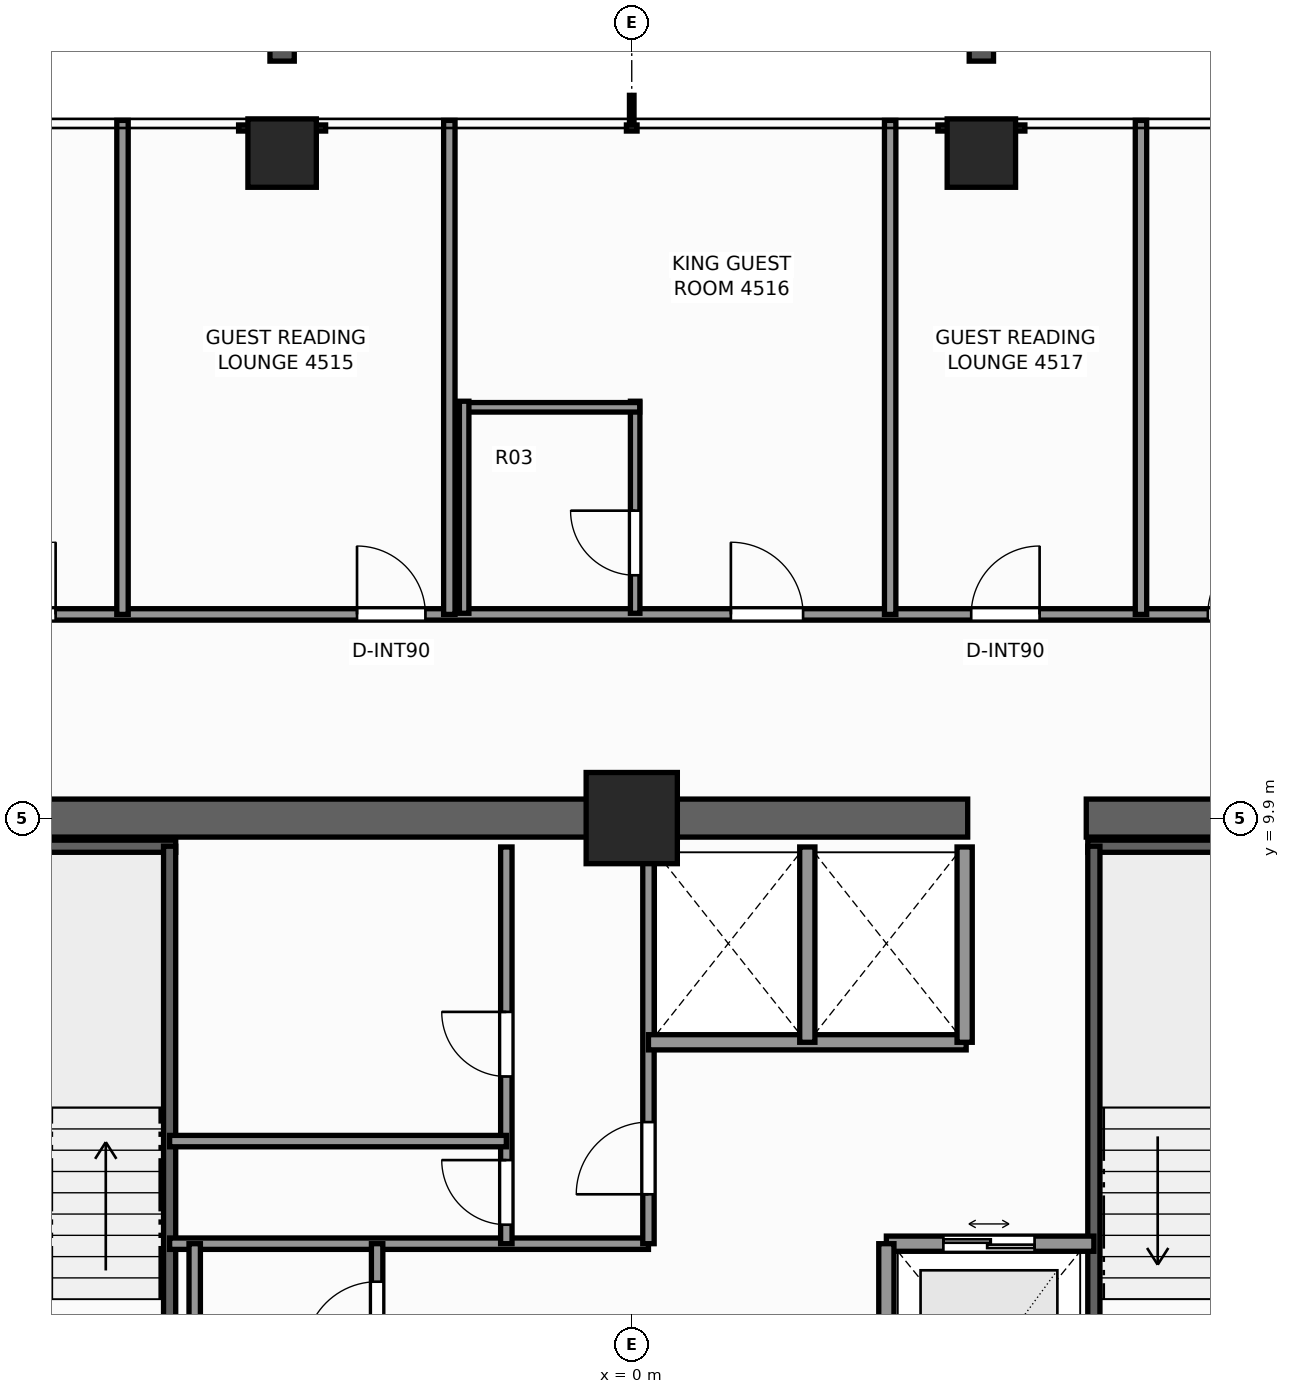
"""IFC4 building model, lengths in metres.
Left out: names, types, materials, properties, quantities, classifications, styles, units other than length and angle.
Written with IfcOpenShell. Run it as: python <this file> out.ifc"""

import sys

from ifc_helpers import new_model, si_unit, direction, frame, frame_2d, origin, origin_2d, place, context, subcontext, project, spatial, rectangle, extrude, element, fill, save


model = new_model("IFC4")
c1 = context("Model", 3, precision=1e-05, world=origin(), true_north=direction((0.0, 1.0)))
c2 = subcontext(c1, "Body", "Model", "MODEL_VIEW")
j1 = project(units=[si_unit("LENGTHUNIT", "METRE"), si_unit("PLANEANGLEUNIT", "RADIAN")], contexts=[c1])
p1 = place(None, origin())
s1 = spatial("IfcSite", under=j1, at=p1, CompositionType="ELEMENT")
p2 = place(p1, origin())
s2 = spatial("IfcBuilding", under=s1, at=p2, CompositionType="ELEMENT")
p3 = place(p2, frame((0.0, 0.0, 156.9)))
s3 = spatial("IfcBuildingStorey", under=s2, at=p3, CompositionType="ELEMENT", Elevation=156.9)
p4 = place(p3, frame((-10.15, 9.9, 0.0), z_axis=(0.0, 0.0, 1.0), x_axis=(1.0, 0.0, 0.0)))
e1 = element("IfcWall", 1, at=p4, inside=s3, PredefinedType="SHEAR", context=c2, shape_type="SweptSolid", body=[
    extrude(rectangle(XDim=14.57, YDim=0.5, at=frame_2d((7.285, 0.0))), origin(), (0.0, 0.0, 1.0), 3.3),
])
p5 = place(p3, frame((5.98, 9.9, 0.0), z_axis=(0.0, 0.0, 1.0), x_axis=(1.0, 0.0, 0.0)))
e2 = element("IfcWall", 2, at=p5, inside=s3, PredefinedType="SHEAR", context=c2, shape_type="SweptSolid", body=[
    extrude(rectangle(XDim=4.17, YDim=0.5, at=frame_2d((2.085, 0.0))), origin(), (0.0, 0.0, 1.0), 3.3),
])
p6 = place(p3, frame((0.0, 9.9, 0.0), z_axis=(0.0, 0.0, 1.0), x_axis=(1.0, 0.0, 0.0)))
e3 = element("IfcColumn", 3, at=p6, inside=s3, PredefinedType="COLUMN", context=c2, shape_type="SweptSolid", body=[
    extrude(rectangle(XDim=1.2, YDim=1.2, at=origin_2d()), origin(), (0.0, 0.0, 1.0), 3.3),
])
for number, where, z_axis, x_axis in (
    (4, (-4.6, 18.65, 0.0), (0.0, 0.0, 1.0), (1.0, 0.0, 0.0)),
    (5, (4.6, 18.65, 0.0), (0.0, 0.0, 1.0), (1.0, 0.0, 0.0)),
):
    element("IfcColumn", number, at=place(p3, frame(where, z_axis=z_axis, x_axis=x_axis)), inside=s3, PredefinedType="COLUMN", context=c2, shape_type="SweptSolid", body=[
        extrude(rectangle(XDim=0.9, YDim=0.9, at=origin_2d()), origin(), (0.0, 0.0, 1.0), 3.3),
    ])
p7 = place(p3, frame((-9.52, 9.53, 0.0), z_axis=(0.0, 0.0, 1.0), x_axis=(1.0, 0.0, 0.0)))
e6 = element("IfcWall", 6, at=p7, inside=s3, PredefinedType="SHEAR", context=c2, shape_type="SweptSolid", body=[
    extrude(rectangle(XDim=3.52, YDim=0.16, at=frame_2d((1.76, 0.0))), origin(), (0.0, 0.0, 1.0), 3.3),
])
p8 = place(p3, frame((-6.08, 1.97, 0.0), z_axis=(0.0, 0.0, 1.0), x_axis=(0.0, 1.0, 0.0)))
e7 = element("IfcWall", 7, at=p8, inside=s3, PredefinedType="SHEAR", context=c2, shape_type="SweptSolid", body=[
    extrude(rectangle(XDim=7.56, YDim=0.16, at=frame_2d((3.78, 0.0))), origin(), (0.0, 0.0, 1.0), 3.3),
])
p9 = place(p3, frame((6.0, 9.53, 0.0), z_axis=(0.0, 0.0, 1.0), x_axis=(1.0, 0.0, 0.0)))
e8 = element("IfcWall", 8, at=p9, inside=s3, PredefinedType="SHEAR", context=c2, shape_type="SweptSolid", body=[
    extrude(rectangle(XDim=3.52, YDim=0.16, at=frame_2d((1.76, 0.0))), origin(), (0.0, 0.0, 1.0), 3.3),
])
p10 = place(p3, frame((6.08, 1.97, 0.0), z_axis=(0.0, 0.0, 1.0), x_axis=(0.0, 1.0, 0.0)))
e9 = element("IfcWall", 9, at=p10, inside=s3, PredefinedType="SHEAR", context=c2, shape_type="SweptSolid", body=[
    extrude(rectangle(XDim=7.56, YDim=0.16, at=frame_2d((3.78, 0.0))), origin(), (0.0, 0.0, 1.0), 3.3),
])
p11 = place(p3, frame((3.35, 4.3, 0.0), z_axis=(0.0, 0.0, 1.0), x_axis=(1.0, 0.0, 0.0)))
e10 = element("IfcWall", 10, at=p11, inside=s3, PredefinedType="SOLIDWALL", context=c2, shape_type="SweptSolid", body=[
    extrude(rectangle(XDim=2.73, YDim=0.2, at=frame_2d((1.365, 0.0))), origin(), (0.0, 0.0, 1.0), 3.1),
])
p12 = place(p11, frame((0.75, 0.0, 0.0)))
e11 = element("IfcOpeningElement", 11, at=p12, cuts=e10, PredefinedType="OPENING", context=c2, shape_type="SweptSolid", body=[
    extrude(rectangle(XDim=1.2, YDim=2.25, at=frame_2d((0.6, 1.125))), frame((0.0, 0.11, 0.0), z_axis=(0.0, -1.0, 0.0), x_axis=(1.0, 0.0, 0.0)), (0.0, 0.0, 1.0), 0.22),
])
p13 = place(p3, frame((3.35, 1.1, 0.0), z_axis=(0.0, 0.0, 1.0), x_axis=(0.0, 1.0, 0.0)))
e12 = element("IfcWall", 12, at=p13, inside=s3, PredefinedType="SOLIDWALL", context=c2, shape_type="SweptSolid", body=[
    extrude(rectangle(XDim=3.2, YDim=0.2, at=frame_2d((1.6, 0.0))), origin(), (0.0, 0.0, 1.0), 2.735),
])
p14 = place(p3, frame((-6.08, 4.3, 0.0), z_axis=(0.0, 0.0, 1.0), x_axis=(1.0, 0.0, 0.0)))
e13 = element("IfcWall", 13, at=p14, inside=s3, PredefinedType="PARTITIONING", context=c2, shape_type="SweptSolid", body=[
    extrude(rectangle(XDim=6.3, YDim=0.15, at=frame_2d((3.15, 0.0))), origin(), (0.0, 0.0, 1.0), 3.1),
])
p15 = place(p3, frame((0.22, 4.3, 0.0), z_axis=(0.0, 0.0, 1.0), x_axis=(0.0, 1.0, 0.0)))
e14 = element("IfcWall", 14, at=p15, inside=s3, PredefinedType="PARTITIONING", context=c2, shape_type="SweptSolid", body=[
    extrude(rectangle(XDim=5.22, YDim=0.15, at=frame_2d((2.61, 0.0))), origin(), (0.0, 0.0, 1.0), 3.1),
])
p16 = place(p15, frame((0.65, 0.0, 0.0)))
e15 = element("IfcOpeningElement", 15, at=p16, cuts=e14, PredefinedType="OPENING", context=c2, shape_type="SweptSolid", body=[
    extrude(rectangle(XDim=0.95, YDim=2.06, at=frame_2d((0.475, 1.03))), frame((0.0, 0.085, 0.0), z_axis=(0.0, -1.0, 0.0), x_axis=(1.0, 0.0, 0.0)), (0.0, 0.0, 1.0), 0.17),
])
p17 = place(p3, frame((-1.65, 4.3, 0.0), z_axis=(0.0, 0.0, 1.0), x_axis=(0.0, 1.0, 0.0)))
e16 = element("IfcWall", 16, at=p17, inside=s3, PredefinedType="PARTITIONING", context=c2, shape_type="SweptSolid", body=[
    extrude(rectangle(XDim=5.22, YDim=0.15, at=frame_2d((2.61, 0.0))), origin(), (0.0, 0.0, 1.0), 3.1),
])
p18 = place(p17, frame((2.2, 0.0, 0.0)))
e17 = element("IfcOpeningElement", 17, at=p18, cuts=e16, PredefinedType="OPENING", context=c2, shape_type="SweptSolid", body=[
    extrude(rectangle(XDim=0.85, YDim=2.03, at=frame_2d((0.425, 1.015))), frame((0.0, 0.085, 0.0), z_axis=(0.0, -1.0, 0.0), x_axis=(1.0, 0.0, 0.0)), (0.0, 0.0, 1.0), 0.17),
])
p19 = place(p17, frame((0.25, 0.0, 0.0)))
e18 = element("IfcOpeningElement", 18, at=p19, cuts=e16, PredefinedType="OPENING", context=c2, shape_type="SweptSolid", body=[
    extrude(rectangle(XDim=0.85, YDim=2.03, at=frame_2d((0.425, 1.015))), frame((0.0, 0.085, 0.0), z_axis=(0.0, -1.0, 0.0), x_axis=(1.0, 0.0, 0.0)), (0.0, 0.0, 1.0), 0.17),
])
p20 = place(p3, frame((-6.08, 5.65, 0.0), z_axis=(0.0, 0.0, 1.0), x_axis=(1.0, 0.0, 0.0)))
e19 = element("IfcWall", 19, at=p20, inside=s3, PredefinedType="PARTITIONING", context=c2, shape_type="SweptSolid", body=[
    extrude(rectangle(XDim=4.43, YDim=0.15, at=frame_2d((2.215, 0.0))), origin(), (0.0, 0.0, 1.0), 3.1),
])
p21 = place(p3, frame((0.22, 6.95, 0.0), z_axis=(0.0, 0.0, 1.0), x_axis=(1.0, 0.0, 0.0)))
e20 = element("IfcWall", 20, at=p21, inside=s3, PredefinedType="SOLIDWALL", context=c2, shape_type="SweptSolid", body=[
    extrude(rectangle(XDim=4.18, YDim=0.2, at=frame_2d((2.09, 0.0))), origin(), (0.0, 0.0, 1.0), 3.1),
])
for number, where, z_axis, x_axis in (
    (21, (4.38, 6.95, 0.0), (0.0, 0.0, 1.0), (0.0, 1.0, 0.0)),
    (22, (2.31, 6.95, 0.0), (0.0, 0.0, 1.0), (0.0, 1.0, 0.0)),
):
    element("IfcWall", number, at=place(p3, frame(where, z_axis=z_axis, x_axis=x_axis)), inside=s3, PredefinedType="SOLIDWALL", context=c2, shape_type="SweptSolid", body=[
        extrude(rectangle(XDim=2.57, YDim=0.2, at=frame_2d((1.285, 0.0))), origin(), (0.0, 0.0, 1.0), 3.1),
    ])
p22 = place(p3, frame((-3.35, 1.1, 0.0), z_axis=(0.0, 0.0, 1.0), x_axis=(0.0, 1.0, 0.0)))
e23 = element("IfcWall", 23, at=p22, inside=s3, PredefinedType="PARTITIONING", context=c2, shape_type="SweptSolid", body=[
    extrude(rectangle(XDim=3.2, YDim=0.15, at=frame_2d((1.6, 0.0))), origin(), (0.0, 0.0, 1.0), 2.735),
])
p23 = place(p22, frame((1.75, 0.0, 0.0)))
e24 = element("IfcOpeningElement", 24, at=p23, cuts=e23, PredefinedType="OPENING", context=c2, shape_type="SweptSolid", body=[
    extrude(rectangle(XDim=0.95, YDim=2.06, at=frame_2d((0.475, 1.03))), frame((0.0, 0.085, 0.0), z_axis=(0.0, -1.0, 0.0), x_axis=(1.0, 0.0, 0.0)), (0.0, 0.0, 1.0), 0.17),
])
p24 = place(p3, frame((-5.75, 1.97, 0.0), z_axis=(0.0, 0.0, 1.0), x_axis=(0.0, 1.0, 0.0)))
e25 = element("IfcWall", 25, at=p24, inside=s3, PredefinedType="PARTITIONING", context=c2, shape_type="SweptSolid", body=[
    extrude(rectangle(XDim=2.33, YDim=0.15, at=frame_2d((1.165, 0.0))), origin(), (0.0, 0.0, 1.0), 2.735),
])
p25 = place(p3, frame((-12.42, 12.58, 0.0), z_axis=(0.0, 0.0, 1.0), x_axis=(1.0, 0.0, 0.0)))
e26 = element("IfcWall", 26, at=p25, inside=s3, PredefinedType="PARTITIONING", context=c2, shape_type="SweptSolid", body=[
    extrude(rectangle(XDim=24.84, YDim=0.15, at=frame_2d((12.42, 0.0))), origin(), (0.0, 0.0, 1.0), 2.389),
])
p26 = place(p25, frame((3.89, 0.0, 0.0)))
e27 = element("IfcOpeningElement", 27, at=p26, cuts=e26, PredefinedType="OPENING", context=c2, shape_type="SweptSolid", body=[
    extrude(rectangle(XDim=0.95, YDim=2.06, at=frame_2d((0.475, 1.03))), frame((0.0, 0.085, 0.0), z_axis=(0.0, -1.0, 0.0), x_axis=(1.0, 0.0, 0.0)), (0.0, 0.0, 1.0), 0.17),
])
p27 = place(p25, frame((8.806, 0.0, 0.0)))
e28 = element("IfcOpeningElement", 28, at=p27, cuts=e26, PredefinedType="OPENING", context=c2, shape_type="SweptSolid", body=[
    extrude(rectangle(XDim=0.9, YDim=2.06, at=frame_2d((0.45, 1.03))), frame((0.0, 0.085, 0.0), z_axis=(0.0, -1.0, 0.0), x_axis=(1.0, 0.0, 0.0)), (0.0, 0.0, 1.0), 0.17),
])
p28 = place(p25, frame((13.724, 0.0, 0.0)))
e29 = element("IfcOpeningElement", 29, at=p28, cuts=e26, PredefinedType="OPENING", context=c2, shape_type="SweptSolid", body=[
    extrude(rectangle(XDim=0.95, YDim=2.06, at=frame_2d((0.475, 1.03))), frame((0.0, 0.085, 0.0), z_axis=(0.0, -1.0, 0.0), x_axis=(1.0, 0.0, 0.0)), (0.0, 0.0, 1.0), 0.17),
])
p29 = place(p25, frame((16.886, 0.0, 0.0)))
e30 = element("IfcOpeningElement", 30, at=p29, cuts=e26, PredefinedType="OPENING", context=c2, shape_type="SweptSolid", body=[
    extrude(rectangle(XDim=0.9, YDim=2.06, at=frame_2d((0.45, 1.03))), frame((0.0, 0.085, 0.0), z_axis=(0.0, -1.0, 0.0), x_axis=(1.0, 0.0, 0.0)), (0.0, 0.0, 1.0), 0.17),
])
p30 = place(p25, frame((20.0, 0.0, 0.0)))
e31 = element("IfcOpeningElement", 31, at=p30, cuts=e26, PredefinedType="OPENING", context=c2, shape_type="SweptSolid", body=[
    extrude(rectangle(XDim=0.95, YDim=2.06, at=frame_2d((0.475, 1.03))), frame((0.0, 0.085, 0.0), z_axis=(0.0, -1.0, 0.0), x_axis=(1.0, 0.0, 0.0)), (0.0, 0.0, 1.0), 0.17),
])
for number, where, z_axis, x_axis in (
    (32, (-6.7, 12.58, 0.0), (0.0, 0.0, 1.0), (0.0, 1.0, 0.0)),
    (33, (-2.4, 12.58, 0.0), (0.0, 0.0, 1.0), (0.0, 1.0, 0.0)),
    (34, (3.4, 12.58, 0.0), (0.0, 0.0, 1.0), (0.0, 1.0, 0.0)),
):
    element("IfcWall", number, at=place(p3, frame(where, z_axis=z_axis, x_axis=x_axis)), inside=s3, PredefinedType="PARTITIONING", context=c2, shape_type="SweptSolid", body=[
        extrude(rectangle(XDim=6.5, YDim=0.15, at=frame_2d((3.25, 0.0))), origin(), (0.0, 0.0, 1.0), 2.473),
    ])
p31 = place(p3, frame((0.045, 12.595, 0.0), z_axis=(0.0, 0.0, 1.0), x_axis=(0.0, 1.0, 0.0)))
e35 = element("IfcWall", 35, at=p31, inside=s3, PredefinedType="PARTITIONING", context=c2, shape_type="SweptSolid", body=[
    extrude(rectangle(XDim=2.79, YDim=0.125, at=frame_2d((1.395, 0.0))), origin(), (0.0, 0.0, 1.0), 2.625),
])
p32 = place(p31, frame((0.5, 0.0, 0.0)))
e36 = element("IfcOpeningElement", 36, at=p32, cuts=e35, PredefinedType="OPENING", context=c2, shape_type="SweptSolid", body=[
    extrude(rectangle(XDim=0.85, YDim=2.03, at=frame_2d((0.425, 1.015))), frame((0.0, 0.073, 0.0), z_axis=(0.0, -1.0, 0.0), x_axis=(1.0, 0.0, 0.0)), (0.0, 0.0, 1.0), 0.145),
])
p33 = place(p3, frame((-2.265, 15.305, 0.0), z_axis=(0.0, 0.0, 1.0), x_axis=(1.0, 0.0, 0.0)))
e37 = element("IfcWall", 37, at=p33, inside=s3, PredefinedType="PARTITIONING", context=c2, shape_type="SweptSolid", body=[
    extrude(rectangle(XDim=2.37, YDim=0.125, at=frame_2d((1.185, 0.0))), origin(), (0.0, 0.0, 1.0), 2.625),
])
p34 = place(p3, frame((-2.205, 12.595, 0.0), z_axis=(0.0, 0.0, 1.0), x_axis=(0.0, 1.0, 0.0)))
e38 = element("IfcWall", 38, at=p34, inside=s3, PredefinedType="PARTITIONING", context=c2, shape_type="SweptSolid", body=[
    extrude(rectangle(XDim=2.79, YDim=0.125, at=frame_2d((1.395, 0.0))), origin(), (0.0, 0.0, 1.0), 3.1),
])
p35 = place(p3, frame((6.7, 12.58, 0.0), z_axis=(0.0, 0.0, 1.0), x_axis=(0.0, 1.0, 0.0)))
e39 = element("IfcWall", 39, at=p35, inside=s3, PredefinedType="PARTITIONING", context=c2, shape_type="SweptSolid", body=[
    extrude(rectangle(XDim=6.5, YDim=0.15, at=frame_2d((3.25, 0.0))), origin(), (0.0, 0.0, 1.0), 2.473),
])
p36 = place(p12, origin())
e40 = element("IfcDoor", 40, at=p36, inside=s3, OperationType="DOUBLE_DOOR_SLIDING", PredefinedType="DOOR", context=c2, shape_type="SweptSolid", body=[
    extrude(rectangle(XDim=1.2, YDim=2.25, at=frame_2d((0.6, 1.125))), frame((0.0, 0.025, 0.0), z_axis=(0.0, -1.0, 0.0), x_axis=(1.0, 0.0, 0.0)), (0.0, 0.0, 1.0), 0.05),
])
fill(e11, e40)
p37 = place(p16, origin())
e41 = element("IfcDoor", 41, at=p37, inside=s3, OperationType="SINGLE_SWING_LEFT", PredefinedType="DOOR", context=c2, shape_type="SweptSolid", body=[
    extrude(rectangle(XDim=0.95, YDim=2.06, at=frame_2d((0.475, 1.03))), frame((0.0, 0.025, 0.0), z_axis=(0.0, -1.0, 0.0), x_axis=(1.0, 0.0, 0.0)), (0.0, 0.0, 1.0), 0.05),
])
fill(e15, e41)
p38 = place(p18, origin())
e42 = element("IfcDoor", 42, at=p38, inside=s3, OperationType="SINGLE_SWING_RIGHT", PredefinedType="DOOR", context=c2, shape_type="SweptSolid", body=[
    extrude(rectangle(XDim=0.85, YDim=2.03, at=frame_2d((0.425, 1.015))), frame((0.0, 0.025, 0.0), z_axis=(0.0, -1.0, 0.0), x_axis=(1.0, 0.0, 0.0)), (0.0, 0.0, 1.0), 0.05),
])
fill(e17, e42)
p39 = place(p19, origin())
e43 = element("IfcDoor", 43, at=p39, inside=s3, OperationType="SINGLE_SWING_RIGHT", PredefinedType="DOOR", context=c2, shape_type="SweptSolid", body=[
    extrude(rectangle(XDim=0.85, YDim=2.03, at=frame_2d((0.425, 1.015))), frame((0.0, 0.025, 0.0), z_axis=(0.0, -1.0, 0.0), x_axis=(1.0, 0.0, 0.0)), (0.0, 0.0, 1.0), 0.05),
])
fill(e18, e43)
p40 = place(p23, origin())
e44 = element("IfcDoor", 44, at=p40, inside=s3, OperationType="SINGLE_SWING_LEFT", PredefinedType="DOOR", context=c2, shape_type="SweptSolid", body=[
    extrude(rectangle(XDim=0.95, YDim=2.06, at=frame_2d((0.475, 1.03))), frame((0.0, 0.025, 0.0), z_axis=(0.0, -1.0, 0.0), x_axis=(1.0, 0.0, 0.0)), (0.0, 0.0, 1.0), 0.05),
])
fill(e24, e44)
p41 = place(p26, origin())
e45 = element("IfcDoor", 45, at=p41, inside=s3, OperationType="SINGLE_SWING_RIGHT", PredefinedType="DOOR", context=c2, shape_type="SweptSolid", body=[
    extrude(rectangle(XDim=0.95, YDim=2.06, at=frame_2d((0.475, 1.03))), frame((0.0, 0.025, 0.0), z_axis=(0.0, -1.0, 0.0), x_axis=(1.0, 0.0, 0.0)), (0.0, 0.0, 1.0), 0.05),
])
fill(e27, e45)
p42 = place(p27, origin())
e46 = element("IfcDoor", 46, at=p42, inside=s3, OperationType="SINGLE_SWING_LEFT", PredefinedType="DOOR", context=c2, shape_type="SweptSolid", body=[
    extrude(rectangle(XDim=0.9, YDim=2.06, at=frame_2d((0.45, 1.03))), frame((0.0, 0.025, 0.0), z_axis=(0.0, -1.0, 0.0), x_axis=(1.0, 0.0, 0.0)), (0.0, 0.0, 1.0), 0.05),
])
fill(e28, e46)
p43 = place(p32, origin())
e47 = element("IfcDoor", 47, at=p43, inside=s3, OperationType="SINGLE_SWING_RIGHT", PredefinedType="DOOR", context=c2, shape_type="SweptSolid", body=[
    extrude(rectangle(XDim=0.85, YDim=2.03, at=frame_2d((0.425, 1.015))), frame((0.0, 0.025, 0.0), z_axis=(0.0, -1.0, 0.0), x_axis=(1.0, 0.0, 0.0)), (0.0, 0.0, 1.0), 0.05),
])
fill(e36, e47)
p44 = place(p28, origin())
e48 = element("IfcDoor", 48, at=p44, inside=s3, OperationType="SINGLE_SWING_LEFT", PredefinedType="DOOR", context=c2, shape_type="SweptSolid", body=[
    extrude(rectangle(XDim=0.95, YDim=2.06, at=frame_2d((0.475, 1.03))), frame((0.0, 0.025, 0.0), z_axis=(0.0, -1.0, 0.0), x_axis=(1.0, 0.0, 0.0)), (0.0, 0.0, 1.0), 0.05),
])
fill(e29, e48)
p45 = place(p29, origin())
e49 = element("IfcDoor", 49, at=p45, inside=s3, OperationType="SINGLE_SWING_RIGHT", PredefinedType="DOOR", context=c2, shape_type="SweptSolid", body=[
    extrude(rectangle(XDim=0.9, YDim=2.06, at=frame_2d((0.45, 1.03))), frame((0.0, 0.025, 0.0), z_axis=(0.0, -1.0, 0.0), x_axis=(1.0, 0.0, 0.0)), (0.0, 0.0, 1.0), 0.05),
])
fill(e30, e49)
p46 = place(p30, origin())
e50 = element("IfcDoor", 50, at=p46, inside=s3, OperationType="SINGLE_SWING_RIGHT", PredefinedType="DOOR", context=c2, shape_type="SweptSolid", body=[
    extrude(rectangle(XDim=0.95, YDim=2.06, at=frame_2d((0.475, 1.03))), frame((0.0, 0.025, 0.0), z_axis=(0.0, -1.0, 0.0), x_axis=(1.0, 0.0, 0.0)), (0.0, 0.0, 1.0), 0.05),
])
fill(e31, e50)
save(model, sys.argv[1])
